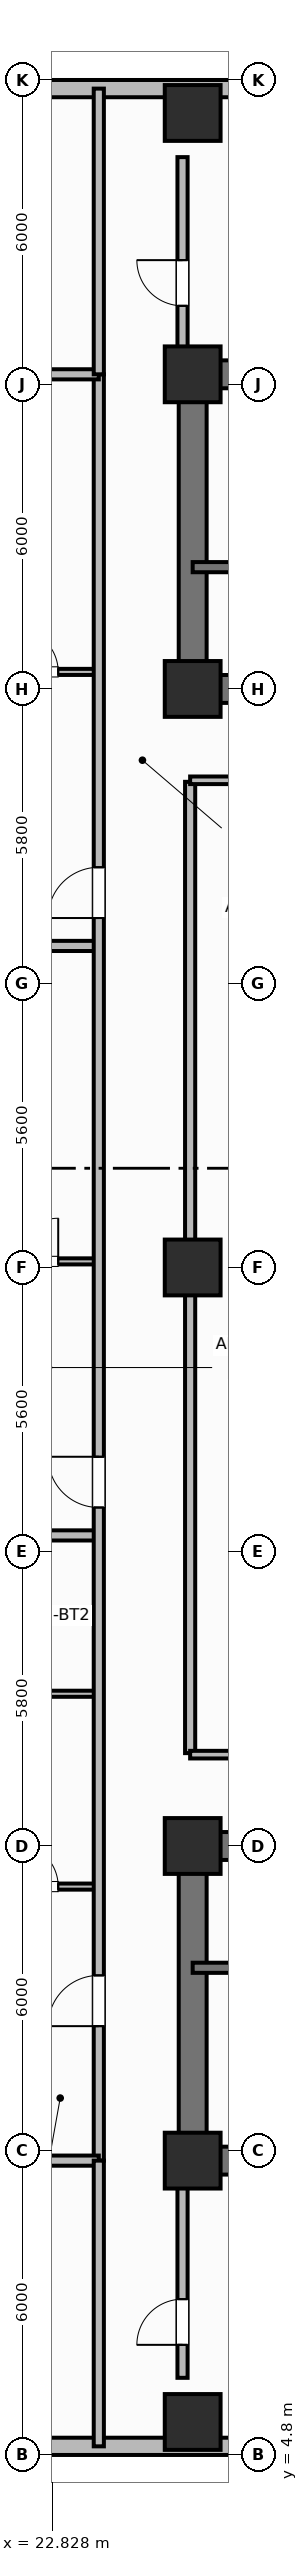
"""IFC4 building model, lengths in metres.
Left out: names, types, materials, properties, quantities, classifications, styles, units other than length and angle.
Written with IfcOpenShell. Run it as: python <this file> out.ifc"""

import sys

from ifc_helpers import new_model, si_unit, direction, frame, frame_2d, origin, origin_2d, place, context, subcontext, project, spatial, rectangle, extrude, element, fill, save


model = new_model("IFC4")
c1 = context("Model", 3, precision=1e-05, world=origin(), true_north=direction((0.0, 1.0)))
c2 = subcontext(c1, "Body", "Model", "MODEL_VIEW")
j1 = project(units=[si_unit("LENGTHUNIT", "METRE"), si_unit("PLANEANGLEUNIT", "RADIAN")], contexts=[c1])
p1 = place(None, origin())
s1 = spatial("IfcSite", under=j1, at=p1, CompositionType="ELEMENT")
p2 = place(p1, origin())
s2 = spatial("IfcBuilding", under=s1, at=p2, CompositionType="ELEMENT")
p3 = place(p2, frame((0.0, 0.0, 106.8)))
s3 = spatial("IfcBuildingStorey", under=s2, at=p3, CompositionType="ELEMENT", Elevation=106.8)
p4 = place(p3, frame((52.8, 10.6, 0.0), z_axis=(0.0, 0.0, 1.0), x_axis=(-1.0, 0.0, 0.0)))
e1 = element("IfcWall", 1, at=p4, inside=s3, PredefinedType="SHEAR", context=c2, shape_type="SweptSolid", body=[
    extrude(rectangle(XDim=27.2, YDim=0.55, at=frame_2d((13.6, 0.0))), origin(), (0.0, 0.0, 1.0), 3.7),
])
p5 = place(p3, frame((25.6, 10.875, 0.0), z_axis=(0.0, 0.0, 1.0), x_axis=(0.0, 1.0, 0.0)))
e2 = element("IfcWall", 2, at=p5, inside=s3, PredefinedType="SHEAR", context=c2, shape_type="SweptSolid", body=[
    extrude(rectangle(XDim=5.65, YDim=0.55, at=frame_2d((2.825, 0.0))), origin(), (0.0, 0.0, 1.0), 3.7),
])
p6 = place(p3, frame((25.6, 16.8, 0.0), z_axis=(0.0, 0.0, 1.0), x_axis=(1.0, 0.0, 0.0)))
e3 = element("IfcWall", 3, at=p6, inside=s3, PredefinedType="SHEAR", context=c2, shape_type="SweptSolid", body=[
    extrude(rectangle(XDim=27.2, YDim=0.55, at=frame_2d((13.6, 0.0))), origin(), (0.0, 0.0, 1.0), 3.7),
])
p7 = place(p6, frame((1.8, 0.0, 0.0)))
e4 = element("IfcOpeningElement", 4, at=p7, cuts=e3, PredefinedType="OPENING", context=c2, shape_type="SweptSolid", body=[
    extrude(rectangle(XDim=1.1, YDim=2.15, at=frame_2d((0.55, 1.075))), frame((0.0, 0.285, 0.0), z_axis=(0.0, -1.0, 0.0), x_axis=(1.0, 0.0, 0.0)), (0.0, 0.0, 1.0), 0.57),
])
p8 = place(p6, frame((5.6, 0.0, 0.0)))
e5 = element("IfcOpeningElement", 5, at=p8, cuts=e3, PredefinedType="OPENING", context=c2, shape_type="SweptSolid", body=[
    extrude(rectangle(XDim=0.85, YDim=2.1, at=frame_2d((0.425, 1.05))), frame((0.0, 0.285, 0.0), z_axis=(0.0, -1.0, 0.0), x_axis=(1.0, 0.0, 0.0)), (0.0, 0.0, 1.0), 0.57),
])
p9 = place(p6, frame((13.0, 0.0, 0.0)))
e6 = element("IfcOpeningElement", 6, at=p9, cuts=e3, PredefinedType="OPENING", context=c2, shape_type="SweptSolid", body=[
    extrude(rectangle(XDim=1.2, YDim=2.15, at=frame_2d((0.6, 1.075))), frame((0.0, 0.285, 0.0), z_axis=(0.0, -1.0, 0.0), x_axis=(1.0, 0.0, 0.0)), (0.0, 0.0, 1.0), 0.57),
])
p10 = place(p6, frame((19.2, 0.0, 0.0)))
e7 = element("IfcOpeningElement", 7, at=p10, cuts=e3, PredefinedType="OPENING", context=c2, shape_type="SweptSolid", body=[
    extrude(rectangle(XDim=0.85, YDim=2.1, at=frame_2d((0.425, 1.05))), frame((0.0, 0.285, 0.0), z_axis=(0.0, -1.0, 0.0), x_axis=(1.0, 0.0, 0.0)), (0.0, 0.0, 1.0), 0.57),
])
p11 = place(p6, frame((23.8, 0.0, 0.0)))
e8 = element("IfcOpeningElement", 8, at=p11, cuts=e3, PredefinedType="OPENING", context=c2, shape_type="SweptSolid", body=[
    extrude(rectangle(XDim=0.9, YDim=2.1, at=frame_2d((0.45, 1.05))), frame((0.0, 0.285, 0.0), z_axis=(0.0, -1.0, 0.0), x_axis=(1.0, 0.0, 0.0)), (0.0, 0.0, 1.0), 0.57),
])
p12 = place(p3, frame((25.6, 45.8, 0.0), z_axis=(0.0, 0.0, 1.0), x_axis=(1.0, 0.0, 0.0)))
e9 = element("IfcWall", 9, at=p12, inside=s3, PredefinedType="SHEAR", context=c2, shape_type="SweptSolid", body=[
    extrude(rectangle(XDim=27.2, YDim=0.55, at=frame_2d((13.6, 0.0))), origin(), (0.0, 0.0, 1.0), 3.7),
])
p13 = place(p3, frame((25.6, 39.875, 0.0), z_axis=(0.0, 0.0, 1.0), x_axis=(0.0, 1.0, 0.0)))
e10 = element("IfcWall", 10, at=p13, inside=s3, PredefinedType="SHEAR", context=c2, shape_type="SweptSolid", body=[
    extrude(rectangle(XDim=5.65, YDim=0.55, at=frame_2d((2.825, 0.0))), origin(), (0.0, 0.0, 1.0), 3.7),
])
p14 = place(p3, frame((52.8, 39.6, 0.0), z_axis=(0.0, 0.0, 1.0), x_axis=(-1.0, 0.0, 0.0)))
e11 = element("IfcWall", 11, at=p14, inside=s3, PredefinedType="SHEAR", context=c2, shape_type="SweptSolid", body=[
    extrude(rectangle(XDim=27.2, YDim=0.55, at=frame_2d((13.6, 0.0))), origin(), (0.0, 0.0, 1.0), 3.7),
])
p15 = place(p14, frame((24.2, 0.0, 0.0)))
e12 = element("IfcOpeningElement", 12, at=p15, cuts=e11, PredefinedType="OPENING", context=c2, shape_type="SweptSolid", body=[
    extrude(rectangle(XDim=1.1, YDim=2.15, at=frame_2d((0.55, 1.075))), frame((0.0, 0.285, 0.0), z_axis=(0.0, -1.0, 0.0), x_axis=(1.0, 0.0, 0.0)), (0.0, 0.0, 1.0), 0.57),
])
p16 = place(p14, frame((20.55, 0.0, 0.0)))
e13 = element("IfcOpeningElement", 13, at=p16, cuts=e11, PredefinedType="OPENING", context=c2, shape_type="SweptSolid", body=[
    extrude(rectangle(XDim=0.95, YDim=2.1, at=frame_2d((0.475, 1.05))), frame((0.0, 0.285, 0.0), z_axis=(0.0, -1.0, 0.0), x_axis=(1.0, 0.0, 0.0)), (0.0, 0.0, 1.0), 0.57),
])
p17 = place(p14, frame((15.1, 0.0, 0.0)))
e14 = element("IfcOpeningElement", 14, at=p17, cuts=e11, PredefinedType="OPENING", context=c2, shape_type="SweptSolid", body=[
    extrude(rectangle(XDim=1.2, YDim=2.15, at=frame_2d((0.6, 1.075))), frame((0.0, 0.285, 0.0), z_axis=(0.0, -1.0, 0.0), x_axis=(1.0, 0.0, 0.0)), (0.0, 0.0, 1.0), 0.57),
])
p18 = place(p14, frame((11.3, 0.0, 0.0)))
e15 = element("IfcOpeningElement", 15, at=p18, cuts=e11, PredefinedType="OPENING", context=c2, shape_type="SweptSolid", body=[
    extrude(rectangle(XDim=1.3, YDim=2.2, at=frame_2d((0.65, 1.1))), frame((0.0, 0.285, 0.0), z_axis=(0.0, -1.0, 0.0), x_axis=(1.0, 0.0, 0.0)), (0.0, 0.0, 1.0), 0.57),
])
p19 = place(p14, frame((7.25, 0.0, 0.0)))
e16 = element("IfcOpeningElement", 16, at=p19, cuts=e11, PredefinedType="OPENING", context=c2, shape_type="SweptSolid", body=[
    extrude(rectangle(XDim=0.85, YDim=2.1, at=frame_2d((0.425, 1.05))), frame((0.0, 0.285, 0.0), z_axis=(0.0, -1.0, 0.0), x_axis=(1.0, 0.0, 0.0)), (0.0, 0.0, 1.0), 0.57),
])
p20 = place(p14, frame((3.0, 0.0, 0.0)))
e17 = element("IfcOpeningElement", 17, at=p20, cuts=e11, PredefinedType="OPENING", context=c2, shape_type="SweptSolid", body=[
    extrude(rectangle(XDim=0.9, YDim=2.1, at=frame_2d((0.45, 1.05))), frame((0.0, 0.285, 0.0), z_axis=(0.0, -1.0, 0.0), x_axis=(1.0, 0.0, 0.0)), (0.0, 0.0, 1.0), 0.57),
])
for number, where, z_axis, x_axis in (
    (18, (25.6, 10.6, 0.0), (0.0, 0.0, 1.0), (1.0, 0.0, 0.0)),
    (19, (25.6, 16.8, 0.0), (0.0, 0.0, 1.0), (1.0, 0.0, 0.0)),
    (20, (25.6, 39.6, 0.0), (0.0, 0.0, 1.0), (1.0, 0.0, 0.0)),
    (21, (25.6, 45.8, 0.0), (0.0, 0.0, 1.0), (1.0, 0.0, 0.0)),
    (22, (25.6, 28.2, 0.0), (0.0, 0.0, 1.0), (1.0, 0.0, 0.0)),
    (23, (25.6, 5.45, 0.0), (0.0, 0.0, 1.0), (1.0, 0.0, 0.0)),
    (24, (25.6, 50.95, 0.0), (0.0, 0.0, 1.0), (1.0, 0.0, 0.0)),
):
    element("IfcColumn", number, at=place(p3, frame(where, z_axis=z_axis, x_axis=x_axis)), inside=s3, PredefinedType="COLUMN", context=c2, shape_type="SweptSolid", body=[
        extrude(rectangle(XDim=1.1, YDim=1.1, at=origin_2d()), origin(), (0.0, 0.0, 1.0), 3.7),
    ])
p21 = place(p3, frame((18.6, 4.97, 0.0), z_axis=(0.0, 0.0, 1.0), x_axis=(1.0, 0.0, 0.0)))
e25 = element("IfcWall", 25, at=p21, inside=s3, PredefinedType="SOLIDWALL", context=c2, shape_type="SweptSolid", body=[
    extrude(rectangle(XDim=17.4, YDim=0.34, at=frame_2d((8.7, 0.0))), origin(), (0.0, 0.0, 1.0), 2.7),
])
p22 = place(p21, frame((1.46, 0.0, 0.68)))
e26 = element("IfcOpeningElement", 26, at=p22, cuts=e25, PredefinedType="OPENING", context=c2, shape_type="SweptSolid", body=[
    extrude(rectangle(XDim=1.6, YDim=1.9, at=frame_2d((0.8, 0.95))), frame((0.0, 0.18, 0.0), z_axis=(0.0, -1.0, 0.0), x_axis=(1.0, 0.0, 0.0)), (0.0, 0.0, 1.0), 0.36),
])
p23 = place(p21, frame((8.25, 0.0, 0.68)))
e27 = element("IfcOpeningElement", 27, at=p23, cuts=e25, PredefinedType="OPENING", context=c2, shape_type="SweptSolid", body=[
    extrude(rectangle(XDim=1.6, YDim=1.9, at=frame_2d((0.8, 0.95))), frame((0.0, 0.18, 0.0), z_axis=(0.0, -1.0, 0.0), x_axis=(1.0, 0.0, 0.0)), (0.0, 0.0, 1.0), 0.36),
])
p24 = place(p21, frame((13.64, 0.0, 0.68)))
e28 = element("IfcOpeningElement", 28, at=p24, cuts=e25, PredefinedType="OPENING", context=c2, shape_type="SweptSolid", body=[
    extrude(rectangle(XDim=1.6, YDim=1.9, at=frame_2d((0.8, 0.95))), frame((0.0, 0.18, 0.0), z_axis=(0.0, -1.0, 0.0), x_axis=(1.0, 0.0, 0.0)), (0.0, 0.0, 1.0), 0.36),
])
p25 = place(p3, frame((36.0, 51.43, 0.0), z_axis=(0.0, 0.0, 1.0), x_axis=(-1.0, 0.0, 0.0)))
e29 = element("IfcWall", 29, at=p25, inside=s3, PredefinedType="SOLIDWALL", context=c2, shape_type="SweptSolid", body=[
    extrude(rectangle(XDim=17.4, YDim=0.34, at=frame_2d((8.7, 0.0))), origin(), (0.0, 0.0, 1.0), 2.7),
])
p26 = place(p25, frame((5.637, 0.0, 0.68)))
e30 = element("IfcOpeningElement", 30, at=p26, cuts=e29, PredefinedType="OPENING", context=c2, shape_type="SweptSolid", body=[
    extrude(rectangle(XDim=2.1, YDim=1.9, at=frame_2d((1.05, 0.95))), frame((0.0, 0.18, 0.0), z_axis=(0.0, -1.0, 0.0), x_axis=(1.0, 0.0, 0.0)), (0.0, 0.0, 1.0), 0.36),
])
p27 = place(p25, frame((13.688, 0.0, 0.68)))
e31 = element("IfcOpeningElement", 31, at=p27, cuts=e29, PredefinedType="OPENING", context=c2, shape_type="SweptSolid", body=[
    extrude(rectangle(XDim=2.1, YDim=1.9, at=frame_2d((1.05, 0.95))), frame((0.0, 0.18, 0.0), z_axis=(0.0, -1.0, 0.0), x_axis=(1.0, 0.0, 0.0)), (0.0, 0.0, 1.0), 0.36),
])
p28 = place(p3, frame((25.6, 14.4, 0.0), z_axis=(0.0, 0.0, 1.0), x_axis=(1.0, 0.0, 0.0)))
e32 = element("IfcWall", 32, at=p28, inside=s3, PredefinedType="SHEAR", context=c2, shape_type="SweptSolid", body=[
    extrude(rectangle(XDim=9.55, YDim=0.2, at=frame_2d((4.775, 0.0))), origin(), (0.0, 0.0, 1.0), 3.7),
])
p29 = place(p28, frame((1.05, 0.0, 0.0)))
e33 = element("IfcOpeningElement", 33, at=p29, cuts=e32, PredefinedType="OPENING", context=c2, shape_type="SweptSolid", body=[
    extrude(rectangle(XDim=1.1, YDim=2.15, at=frame_2d((0.55, 1.075))), frame((0.0, 0.11, 0.0), z_axis=(0.0, -1.0, 0.0), x_axis=(1.0, 0.0, 0.0)), (0.0, 0.0, 1.0), 0.22),
])
p30 = place(p3, frame((35.15, 42.0, 0.0), z_axis=(0.0, 0.0, 1.0), x_axis=(-1.0, 0.0, 0.0)))
e34 = element("IfcWall", 34, at=p30, inside=s3, PredefinedType="SHEAR", context=c2, shape_type="SweptSolid", body=[
    extrude(rectangle(XDim=9.55, YDim=0.2, at=frame_2d((4.775, 0.0))), origin(), (0.0, 0.0, 1.0), 3.7),
])
p31 = place(p30, frame((7.25, 0.0, 0.0)))
e35 = element("IfcOpeningElement", 35, at=p31, cuts=e34, PredefinedType="OPENING", context=c2, shape_type="SweptSolid", body=[
    extrude(rectangle(XDim=1.1, YDim=2.15, at=frame_2d((0.55, 1.075))), frame((0.0, 0.11, 0.0), z_axis=(0.0, -1.0, 0.0), x_axis=(1.0, 0.0, 0.0)), (0.0, 0.0, 1.0), 0.22),
])
p32 = place(p3, frame((25.55, 18.63, 0.0), z_axis=(0.0, 0.0, 1.0), x_axis=(0.0, 1.0, 0.0)))
e36 = element("IfcWall", 36, at=p32, inside=s3, PredefinedType="PARTITIONING", context=c2, shape_type="SweptSolid", body=[
    extrude(rectangle(XDim=19.14, YDim=0.2, at=frame_2d((9.57, 0.0))), origin(), (0.0, 0.0, 1.0), 2.53),
])
for number, where, z_axis, x_axis in (
    (37, (25.55, 18.6, 0.0), (0.0, 0.0, 1.0), (1.0, 0.0, 0.0)),
    (38, (25.55, 37.8, 0.0), (0.0, 0.0, 1.0), (1.0, 0.0, 0.0)),
):
    element("IfcWall", number, at=place(p3, frame(where, z_axis=z_axis, x_axis=x_axis)), inside=s3, PredefinedType="PARTITIONING", context=c2, shape_type="SweptSolid", body=[
        extrude(rectangle(XDim=6.5, YDim=0.15, at=frame_2d((3.25, 0.0))), origin(), (0.0, 0.0, 1.0), 2.53),
    ])
p33 = place(p3, frame((21.5, 16.0, 0.0), z_axis=(0.0, 0.0, 1.0), x_axis=(1.0, 0.0, 0.0)))
e39 = element("IfcWall", 39, at=p33, inside=s3, PredefinedType="PARTITIONING", context=c2, shape_type="SweptSolid", body=[
    extrude(rectangle(XDim=2.25, YDim=0.12, at=frame_2d((1.125, 0.0))), origin(), (0.0, 0.0, 1.0), 2.53),
])
p34 = place(p33, frame((0.6, 0.0, 0.0)))
e40 = element("IfcOpeningElement", 40, at=p34, cuts=e39, PredefinedType="OPENING", context=c2, shape_type="SweptSolid", body=[
    extrude(rectangle(XDim=0.85, YDim=2.1, at=frame_2d((0.425, 1.05))), frame((0.0, 0.07, 0.0), z_axis=(0.0, -1.0, 0.0), x_axis=(1.0, 0.0, 0.0)), (0.0, 0.0, 1.0), 0.14),
])
p35 = place(p3, frame((21.5, 19.8, 0.0), z_axis=(0.0, 0.0, 1.0), x_axis=(1.0, 0.0, 0.0)))
e41 = element("IfcWall", 41, at=p35, inside=s3, PredefinedType="PARTITIONING", context=c2, shape_type="SweptSolid", body=[
    extrude(rectangle(XDim=2.25, YDim=0.12, at=frame_2d((1.125, 0.0))), origin(), (0.0, 0.0, 1.0), 2.53),
])
p36 = place(p3, frame((14.57, 22.92, 0.0), z_axis=(0.0, 0.0, 1.0), x_axis=(1.0, 0.0, 0.0)))
e42 = element("IfcWall", 42, at=p36, inside=s3, PredefinedType="PARTITIONING", context=c2, shape_type="SweptSolid", body=[
    extrude(rectangle(XDim=9.18, YDim=0.2, at=frame_2d((4.59, 0.0))), origin(), (0.0, 0.0, 1.0), 2.53),
])
p37 = place(p3, frame((21.5, 28.32, 0.0), z_axis=(0.0, 0.0, 1.0), x_axis=(1.0, 0.0, 0.0)))
e43 = element("IfcWall", 43, at=p37, inside=s3, PredefinedType="PARTITIONING", context=c2, shape_type="SweptSolid", body=[
    extrude(rectangle(XDim=2.25, YDim=0.12, at=frame_2d((1.125, 0.0))), origin(), (0.0, 0.0, 1.0), 2.53),
])
p38 = place(p37, frame((0.6, 0.0, 0.0)))
e44 = element("IfcOpeningElement", 44, at=p38, cuts=e43, PredefinedType="OPENING", context=c2, shape_type="SweptSolid", body=[
    extrude(rectangle(XDim=0.85, YDim=2.1, at=frame_2d((0.425, 1.05))), frame((0.0, 0.07, 0.0), z_axis=(0.0, -1.0, 0.0), x_axis=(1.0, 0.0, 0.0)), (0.0, 0.0, 1.0), 0.14),
])
p39 = place(p3, frame((14.57, 34.536, 0.0), z_axis=(0.0, 0.0, 1.0), x_axis=(1.0, 0.0, 0.0)))
e45 = element("IfcWall", 45, at=p39, inside=s3, PredefinedType="PARTITIONING", context=c2, shape_type="SweptSolid", body=[
    extrude(rectangle(XDim=9.18, YDim=0.2, at=frame_2d((4.59, 0.0))), origin(), (0.0, 0.0, 1.0), 2.53),
])
p40 = place(p3, frame((21.5, 39.936, 0.0), z_axis=(0.0, 0.0, 1.0), x_axis=(1.0, 0.0, 0.0)))
e46 = element("IfcWall", 46, at=p40, inside=s3, PredefinedType="PARTITIONING", context=c2, shape_type="SweptSolid", body=[
    extrude(rectangle(XDim=2.25, YDim=0.12, at=frame_2d((1.125, 0.0))), origin(), (0.0, 0.0, 1.0), 2.53),
])
p41 = place(p40, frame((0.6, 0.0, 0.0)))
e47 = element("IfcOpeningElement", 47, at=p41, cuts=e46, PredefinedType="OPENING", context=c2, shape_type="SweptSolid", body=[
    extrude(rectangle(XDim=0.85, YDim=2.1, at=frame_2d((0.425, 1.05))), frame((0.0, 0.07, 0.0), z_axis=(0.0, -1.0, 0.0), x_axis=(1.0, 0.0, 0.0)), (0.0, 0.0, 1.0), 0.14),
])
p42 = place(p3, frame((23.75, 10.6, 0.0), z_axis=(0.0, 0.0, 1.0), x_axis=(0.0, 1.0, 0.0)))
e48 = element("IfcWall", 48, at=p42, inside=s3, PredefinedType="PARTITIONING", context=c2, shape_type="SweptSolid", body=[
    extrude(rectangle(XDim=35.2, YDim=0.2, at=frame_2d((17.6, 0.0))), origin(), (0.0, 0.0, 1.0), 2.53),
])
p43 = place(p42, frame((2.65, 0.0, 0.0)))
e49 = element("IfcOpeningElement", 49, at=p43, cuts=e48, PredefinedType="OPENING", context=c2, shape_type="SweptSolid", body=[
    extrude(rectangle(XDim=1.0, YDim=2.15, at=frame_2d((0.5, 1.075))), frame((0.0, 0.11, 0.0), z_axis=(0.0, -1.0, 0.0), x_axis=(1.0, 0.0, 0.0)), (0.0, 0.0, 1.0), 0.22),
])
p44 = place(p42, frame((12.87, 0.0, 0.0)))
e50 = element("IfcOpeningElement", 50, at=p44, cuts=e48, PredefinedType="OPENING", context=c2, shape_type="SweptSolid", body=[
    extrude(rectangle(XDim=1.0, YDim=2.15, at=frame_2d((0.5, 1.075))), frame((0.0, 0.11, 0.0), z_axis=(0.0, -1.0, 0.0), x_axis=(1.0, 0.0, 0.0)), (0.0, 0.0, 1.0), 0.22),
])
p45 = place(p42, frame((24.486, 0.0, 0.0)))
e51 = element("IfcOpeningElement", 51, at=p45, cuts=e48, PredefinedType="OPENING", context=c2, shape_type="SweptSolid", body=[
    extrude(rectangle(XDim=1.0, YDim=2.15, at=frame_2d((0.5, 1.075))), frame((0.0, 0.11, 0.0), z_axis=(0.0, -1.0, 0.0), x_axis=(1.0, 0.0, 0.0)), (0.0, 0.0, 1.0), 0.22),
])
for number, where, z_axis, x_axis in (
    (52, (14.99, 10.6, 0.0), (0.0, 0.0, 1.0), (1.0, 0.0, 0.0)),
    (53, (14.99, 45.8, 0.0), (0.0, 0.0, 1.0), (1.0, 0.0, 0.0)),
):
    element("IfcWall", number, at=place(p3, frame(where, z_axis=z_axis, x_axis=x_axis)), inside=s3, PredefinedType="PARTITIONING", context=c2, shape_type="SweptSolid", body=[
        extrude(rectangle(XDim=8.76, YDim=0.2, at=frame_2d((4.38, 0.0))), origin(), (0.0, 0.0, 1.0), 2.53),
    ])
p46 = place(p3, frame((23.75, 4.97, 0.0), z_axis=(0.0, 0.0, 1.0), x_axis=(0.0, 1.0, 0.0)))
e54 = element("IfcWall", 54, at=p46, inside=s3, PredefinedType="PARTITIONING", context=c2, shape_type="SweptSolid", body=[
    extrude(rectangle(XDim=5.63, YDim=0.2, at=frame_2d((2.815, 0.0))), origin(), (0.0, 0.0, 1.0), 2.53),
])
p47 = place(p3, frame((23.75, 45.8, 0.0), z_axis=(0.0, 0.0, 1.0), x_axis=(0.0, 1.0, 0.0)))
e55 = element("IfcWall", 55, at=p47, inside=s3, PredefinedType="PARTITIONING", context=c2, shape_type="SweptSolid", body=[
    extrude(rectangle(XDim=5.63, YDim=0.2, at=frame_2d((2.815, 0.0))), origin(), (0.0, 0.0, 1.0), 2.53),
])
p48 = place(p3, frame((25.4, 6.32, 0.0), z_axis=(0.0, 0.0, 1.0), x_axis=(0.0, 1.0, 0.0)))
e56 = element("IfcWall", 56, at=p48, inside=s3, PredefinedType="PARTITIONING", context=c2, shape_type="SweptSolid", body=[
    extrude(rectangle(XDim=3.98, YDim=0.2, at=frame_2d((1.99, 0.0))), origin(), (0.0, 0.0, 1.0), 2.53),
])
p49 = place(p48, frame((0.65, 0.0, 0.0)))
e57 = element("IfcOpeningElement", 57, at=p49, cuts=e56, PredefinedType="OPENING", context=c2, shape_type="SweptSolid", body=[
    extrude(rectangle(XDim=0.9, YDim=2.1, at=frame_2d((0.45, 1.05))), frame((0.0, 0.11, 0.0), z_axis=(0.0, -1.0, 0.0), x_axis=(1.0, 0.0, 0.0)), (0.0, 0.0, 1.0), 0.22),
])
p50 = place(p3, frame((25.4, 46.1, 0.0), z_axis=(0.0, 0.0, 1.0), x_axis=(0.0, 1.0, 0.0)))
e58 = element("IfcWall", 58, at=p50, inside=s3, PredefinedType="PARTITIONING", context=c2, shape_type="SweptSolid", body=[
    extrude(rectangle(XDim=3.98, YDim=0.2, at=frame_2d((1.99, 0.0))), origin(), (0.0, 0.0, 1.0), 2.53),
])
p51 = place(p50, frame((1.05, 0.0, 0.0)))
e59 = element("IfcOpeningElement", 59, at=p51, cuts=e58, PredefinedType="OPENING", context=c2, shape_type="SweptSolid", body=[
    extrude(rectangle(XDim=0.9, YDim=2.1, at=frame_2d((0.45, 1.05))), frame((0.0, 0.11, 0.0), z_axis=(0.0, -1.0, 0.0), x_axis=(1.0, 0.0, 0.0)), (0.0, 0.0, 1.0), 0.22),
])
p52 = place(p34, origin())
e60 = element("IfcDoor", 60, at=p52, inside=s3, OperationType="SINGLE_SWING_LEFT", PredefinedType="DOOR", context=c2, shape_type="SweptSolid", body=[
    extrude(rectangle(XDim=0.85, YDim=2.1, at=frame_2d((0.425, 1.05))), frame((0.0, 0.025, 0.0), z_axis=(0.0, -1.0, 0.0), x_axis=(1.0, 0.0, 0.0)), (0.0, 0.0, 1.0), 0.05),
])
fill(e40, e60)
p53 = place(p38, origin())
e61 = element("IfcDoor", 61, at=p53, inside=s3, OperationType="SINGLE_SWING_RIGHT", PredefinedType="DOOR", context=c2, shape_type="SweptSolid", body=[
    extrude(rectangle(XDim=0.85, YDim=2.1, at=frame_2d((0.425, 1.05))), frame((0.0, 0.025, 0.0), z_axis=(0.0, -1.0, 0.0), x_axis=(1.0, 0.0, 0.0)), (0.0, 0.0, 1.0), 0.05),
])
fill(e44, e61)
p54 = place(p41, origin())
e62 = element("IfcDoor", 62, at=p54, inside=s3, OperationType="SINGLE_SWING_LEFT", PredefinedType="DOOR", context=c2, shape_type="SweptSolid", body=[
    extrude(rectangle(XDim=0.85, YDim=2.1, at=frame_2d((0.425, 1.05))), frame((0.0, 0.025, 0.0), z_axis=(0.0, -1.0, 0.0), x_axis=(1.0, 0.0, 0.0)), (0.0, 0.0, 1.0), 0.05),
])
fill(e47, e62)
p55 = place(p43, origin())
e63 = element("IfcDoor", 63, at=p55, inside=s3, OperationType="SINGLE_SWING_LEFT", PredefinedType="DOOR", context=c2, shape_type="SweptSolid", body=[
    extrude(rectangle(XDim=1.0, YDim=2.15, at=frame_2d((0.5, 1.075))), frame((0.0, 0.025, 0.0), z_axis=(0.0, -1.0, 0.0), x_axis=(1.0, 0.0, 0.0)), (0.0, 0.0, 1.0), 0.05),
])
fill(e49, e63)
p56 = place(p44, origin())
e64 = element("IfcDoor", 64, at=p56, inside=s3, OperationType="SINGLE_SWING_RIGHT", PredefinedType="DOOR", context=c2, shape_type="SweptSolid", body=[
    extrude(rectangle(XDim=1.0, YDim=2.15, at=frame_2d((0.5, 1.075))), frame((0.0, 0.025, 0.0), z_axis=(0.0, -1.0, 0.0), x_axis=(1.0, 0.0, 0.0)), (0.0, 0.0, 1.0), 0.05),
])
fill(e50, e64)
p57 = place(p45, origin())
e65 = element("IfcDoor", 65, at=p57, inside=s3, OperationType="SINGLE_SWING_LEFT", PredefinedType="DOOR", context=c2, shape_type="SweptSolid", body=[
    extrude(rectangle(XDim=1.0, YDim=2.15, at=frame_2d((0.5, 1.075))), frame((0.0, 0.025, 0.0), z_axis=(0.0, -1.0, 0.0), x_axis=(1.0, 0.0, 0.0)), (0.0, 0.0, 1.0), 0.05),
])
fill(e51, e65)
p58 = place(p49, origin())
e66 = element("IfcDoor", 66, at=p58, inside=s3, OperationType="SINGLE_SWING_LEFT", PredefinedType="DOOR", context=c2, shape_type="SweptSolid", body=[
    extrude(rectangle(XDim=0.9, YDim=2.1, at=frame_2d((0.45, 1.05))), frame((0.0, 0.025, 0.0), z_axis=(0.0, -1.0, 0.0), x_axis=(1.0, 0.0, 0.0)), (0.0, 0.0, 1.0), 0.05),
])
fill(e57, e66)
p59 = place(p51, origin())
e67 = element("IfcDoor", 67, at=p59, inside=s3, OperationType="SINGLE_SWING_RIGHT", PredefinedType="DOOR", context=c2, shape_type="SweptSolid", body=[
    extrude(rectangle(XDim=0.9, YDim=2.1, at=frame_2d((0.45, 1.05))), frame((0.0, 0.025, 0.0), z_axis=(0.0, -1.0, 0.0), x_axis=(1.0, 0.0, 0.0)), (0.0, 0.0, 1.0), 0.05),
])
fill(e59, e67)
save(model, sys.argv[1])
